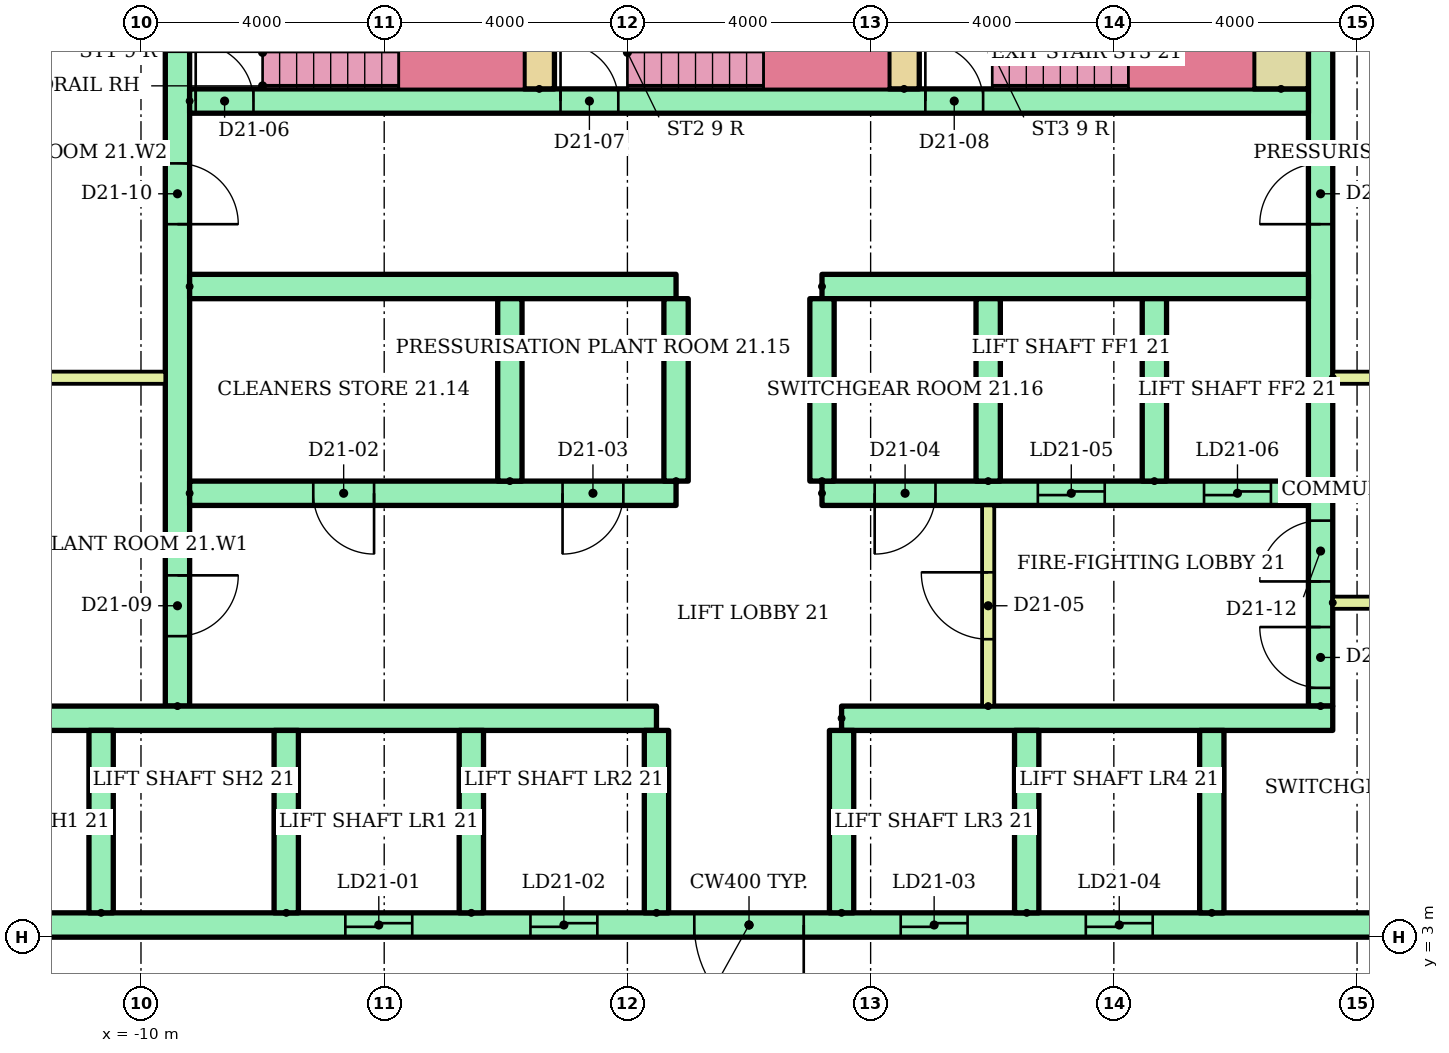
"""IFC4 building model, lengths in metres.
Left out: names, types, materials, properties, quantities, classifications, styles, units other than length and angle.
Written with IfcOpenShell. Run it as: python <this file> out.ifc"""

import sys

from ifc_helpers import new_model, si_unit, direction, frame, frame_2d, origin, place, context, subcontext, project, spatial, rectangle, extrude, element, fill, save


model = new_model("IFC4")
c1 = context("Model", 3, precision=1e-05, world=origin(), true_north=direction((0.0, 1.0)))
c2 = subcontext(c1, "Body", "Model", "MODEL_VIEW")
j1 = project(units=[si_unit("LENGTHUNIT", "METRE"), si_unit("PLANEANGLEUNIT", "RADIAN")], contexts=[c1])
p1 = place(None, origin())
s1 = spatial("IfcSite", under=j1, at=p1, CompositionType="ELEMENT")
p2 = place(p1, origin())
s2 = spatial("IfcBuilding", under=s1, at=p2, CompositionType="ELEMENT")
p3 = place(p2, frame((0.0, 0.0, 83.9)))
s3 = spatial("IfcBuildingStorey", under=s2, at=p3, CompositionType="ELEMENT", Elevation=83.9)
p4 = place(p3, frame((-9.4, 6.8, 0.0), z_axis=(0.0, 0.0, 1.0), x_axis=(0.0, 1.0, 0.0)))
e1 = element("IfcWall", 1, at=p4, inside=s3, PredefinedType="SHEAR", context=c2, shape_type="SweptSolid", body=[
    extrude(rectangle(XDim=12.7, YDim=0.4, at=frame_2d((6.35, 0.0))), origin(), (0.0, 0.0, 1.0), 2.92),
])
p5 = place(p4, frame((1.15, 0.0, 0.0)))
e2 = element("IfcOpeningElement", 2, at=p5, cuts=e1, PredefinedType="OPENING", context=c2, shape_type="SweptSolid", body=[
    extrude(rectangle(XDim=1.0, YDim=2.1, at=frame_2d((0.5, 1.05))), frame((0.0, 0.21, 0.0), z_axis=(0.0, -1.0, 0.0), x_axis=(1.0, 0.0, 0.0)), (0.0, 0.0, 1.0), 0.42),
])
p6 = place(p4, frame((7.925, 0.0, 0.0)))
e3 = element("IfcOpeningElement", 3, at=p6, cuts=e1, PredefinedType="OPENING", context=c2, shape_type="SweptSolid", body=[
    extrude(rectangle(XDim=1.0, YDim=2.1, at=frame_2d((0.5, 1.05))), frame((0.0, 0.21, 0.0), z_axis=(0.0, -1.0, 0.0), x_axis=(1.0, 0.0, 0.0)), (0.0, 0.0, 1.0), 0.42),
])
p7 = place(p3, frame((9.4, 6.8, 0.0), z_axis=(0.0, 0.0, 1.0), x_axis=(0.0, 1.0, 0.0)))
e4 = element("IfcWall", 4, at=p7, inside=s3, PredefinedType="SHEAR", context=c2, shape_type="SweptSolid", body=[
    extrude(rectangle(XDim=12.7, YDim=0.4, at=frame_2d((6.35, 0.0))), origin(), (0.0, 0.0, 1.0), 2.92),
])
p8 = place(p7, frame((0.3, 0.0, 0.0)))
e5 = element("IfcOpeningElement", 5, at=p8, cuts=e4, PredefinedType="OPENING", context=c2, shape_type="SweptSolid", body=[
    extrude(rectangle(XDim=1.0, YDim=2.1, at=frame_2d((0.5, 1.05))), frame((0.0, 0.21, 0.0), z_axis=(0.0, -1.0, 0.0), x_axis=(1.0, 0.0, 0.0)), (0.0, 0.0, 1.0), 0.42),
])
p9 = place(p7, frame((2.05, 0.0, 0.0)))
e6 = element("IfcOpeningElement", 6, at=p9, cuts=e4, PredefinedType="OPENING", context=c2, shape_type="SweptSolid", body=[
    extrude(rectangle(XDim=1.0, YDim=2.1, at=frame_2d((0.5, 1.05))), frame((0.0, 0.21, 0.0), z_axis=(0.0, -1.0, 0.0), x_axis=(1.0, 0.0, 0.0)), (0.0, 0.0, 1.0), 0.42),
])
p10 = place(p7, frame((7.925, 0.0, 0.0)))
e7 = element("IfcOpeningElement", 7, at=p10, cuts=e4, PredefinedType="OPENING", context=c2, shape_type="SweptSolid", body=[
    extrude(rectangle(XDim=1.0, YDim=2.1, at=frame_2d((0.5, 1.05))), frame((0.0, 0.21, 0.0), z_axis=(0.0, -1.0, 0.0), x_axis=(1.0, 0.0, 0.0)), (0.0, 0.0, 1.0), 0.42),
])
p11 = place(p3, frame((-13.5, 3.2, 0.0)))
e8 = element("IfcWall", 8, at=p11, inside=s3, PredefinedType="SHEAR", context=c2, shape_type="SweptSolid", body=[
    extrude(rectangle(XDim=27.0, YDim=0.4, at=frame_2d((13.5, 0.0))), origin(), (0.0, 0.0, 1.0), 2.92),
])
p12 = place(p11, frame((6.861, 0.0, 0.0)))
e9 = element("IfcOpeningElement", 9, at=p12, cuts=e8, PredefinedType="OPENING", context=c2, shape_type="SweptSolid", body=[
    extrude(rectangle(XDim=1.1, YDim=2.1, at=frame_2d((0.55, 1.05))), frame((0.0, 0.21, 0.0), z_axis=(0.0, -1.0, 0.0), x_axis=(1.0, 0.0, 0.0)), (0.0, 0.0, 1.0), 0.42),
])
p13 = place(p11, frame((9.906, 0.0, 0.0)))
e10 = element("IfcOpeningElement", 10, at=p13, cuts=e8, PredefinedType="OPENING", context=c2, shape_type="SweptSolid", body=[
    extrude(rectangle(XDim=1.1, YDim=2.1, at=frame_2d((0.55, 1.05))), frame((0.0, 0.21, 0.0), z_axis=(0.0, -1.0, 0.0), x_axis=(1.0, 0.0, 0.0)), (0.0, 0.0, 1.0), 0.42),
])
p14 = place(p11, frame((15.994, 0.0, 0.0)))
e11 = element("IfcOpeningElement", 11, at=p14, cuts=e8, PredefinedType="OPENING", context=c2, shape_type="SweptSolid", body=[
    extrude(rectangle(XDim=1.1, YDim=2.1, at=frame_2d((0.55, 1.05))), frame((0.0, 0.21, 0.0), z_axis=(0.0, -1.0, 0.0), x_axis=(1.0, 0.0, 0.0)), (0.0, 0.0, 1.0), 0.42),
])
p15 = place(p11, frame((19.039, 0.0, 0.0)))
e12 = element("IfcOpeningElement", 12, at=p15, cuts=e8, PredefinedType="OPENING", context=c2, shape_type="SweptSolid", body=[
    extrude(rectangle(XDim=1.1, YDim=2.1, at=frame_2d((0.55, 1.05))), frame((0.0, 0.21, 0.0), z_axis=(0.0, -1.0, 0.0), x_axis=(1.0, 0.0, 0.0)), (0.0, 0.0, 1.0), 0.42),
])
p16 = place(p11, frame((12.6, 0.0, 0.0)))
e13 = element("IfcOpeningElement", 13, at=p16, cuts=e8, PredefinedType="OPENING", context=c2, shape_type="SweptSolid", body=[
    extrude(rectangle(XDim=1.8, YDim=2.1, at=frame_2d((0.9, 1.05))), frame((0.0, 0.21, 0.0), z_axis=(0.0, -1.0, 0.0), x_axis=(1.0, 0.0, 0.0)), (0.0, 0.0, 1.0), 0.42),
])
p17 = place(p3, frame((-13.5, 6.6, 0.0)))
e14 = element("IfcWall", 14, at=p17, inside=s3, PredefinedType="SHEAR", context=c2, shape_type="SweptSolid", body=[
    extrude(rectangle(XDim=11.978, YDim=0.4, at=frame_2d((5.989, 0.0))), origin(), (0.0, 0.0, 1.0), 2.92),
])
p18 = place(p3, frame((1.522, 6.6, 0.0)))
e15 = element("IfcWall", 15, at=p18, inside=s3, PredefinedType="SHEAR", context=c2, shape_type="SweptSolid", body=[
    extrude(rectangle(XDim=8.078, YDim=0.4, at=frame_2d((4.039, 0.0))), origin(), (0.0, 0.0, 1.0), 2.92),
])
for number, where, z_axis, x_axis in (
    (16, (-10.656, 3.4, 0.0), (0.0, 0.0, 1.0), (0.0, 1.0, 0.0)),
    (17, (-7.611, 3.4, 0.0), (0.0, 0.0, 1.0), (0.0, 1.0, 0.0)),
    (18, (-4.567, 3.4, 0.0), (0.0, 0.0, 1.0), (0.0, 1.0, 0.0)),
    (19, (-1.522, 3.4, 0.0), (0.0, 0.0, 1.0), (0.0, 1.0, 0.0)),
    (20, (1.522, 3.4, 0.0), (0.0, 0.0, 1.0), (0.0, 1.0, 0.0)),
    (21, (4.567, 3.4, 0.0), (0.0, 0.0, 1.0), (0.0, 1.0, 0.0)),
    (22, (7.611, 3.4, 0.0), (0.0, 0.0, 1.0), (0.0, 1.0, 0.0)),
):
    element("IfcWall", number, at=place(p3, frame(where, z_axis=z_axis, x_axis=x_axis)), inside=s3, PredefinedType="SHEAR", context=c2, shape_type="SweptSolid", body=[
        extrude(rectangle(XDim=3.0, YDim=0.4, at=frame_2d((1.5, 0.0))), origin(), (0.0, 0.0, 1.0), 2.92),
    ])
p19 = place(p3, frame((-9.2, 10.3, 0.0)))
e23 = element("IfcWall", 23, at=p19, inside=s3, PredefinedType="SHEAR", context=c2, shape_type="SweptSolid", body=[
    extrude(rectangle(XDim=8.0, YDim=0.4, at=frame_2d((4.0, 0.0))), origin(), (0.0, 0.0, 1.0), 2.92),
])
p20 = place(p19, frame((2.033, 0.0, 0.0)))
e24 = element("IfcOpeningElement", 24, at=p20, cuts=e23, PredefinedType="OPENING", context=c2, shape_type="SweptSolid", body=[
    extrude(rectangle(XDim=1.0, YDim=2.1, at=frame_2d((0.5, 1.05))), frame((0.0, 0.21, 0.0), z_axis=(0.0, -1.0, 0.0), x_axis=(1.0, 0.0, 0.0)), (0.0, 0.0, 1.0), 0.42),
])
p21 = place(p19, frame((6.133, 0.0, 0.0)))
e25 = element("IfcOpeningElement", 25, at=p21, cuts=e23, PredefinedType="OPENING", context=c2, shape_type="SweptSolid", body=[
    extrude(rectangle(XDim=1.0, YDim=2.1, at=frame_2d((0.5, 1.05))), frame((0.0, 0.21, 0.0), z_axis=(0.0, -1.0, 0.0), x_axis=(1.0, 0.0, 0.0)), (0.0, 0.0, 1.0), 0.42),
])
p22 = place(p3, frame((-9.2, 13.7, 0.0)))
e26 = element("IfcWall", 26, at=p22, inside=s3, PredefinedType="SHEAR", context=c2, shape_type="SweptSolid", body=[
    extrude(rectangle(XDim=8.0, YDim=0.4, at=frame_2d((4.0, 0.0))), origin(), (0.0, 0.0, 1.0), 2.92),
])
p23 = place(p3, frame((1.2, 10.3, 0.0)))
e27 = element("IfcWall", 27, at=p23, inside=s3, PredefinedType="SHEAR", context=c2, shape_type="SweptSolid", body=[
    extrude(rectangle(XDim=8.0, YDim=0.4, at=frame_2d((4.0, 0.0))), origin(), (0.0, 0.0, 1.0), 2.92),
])
p24 = place(p23, frame((3.55, 0.0, 0.0)))
e28 = element("IfcOpeningElement", 28, at=p24, cuts=e27, PredefinedType="OPENING", context=c2, shape_type="SweptSolid", body=[
    extrude(rectangle(XDim=1.1, YDim=2.1, at=frame_2d((0.55, 1.05))), frame((0.0, 0.21, 0.0), z_axis=(0.0, -1.0, 0.0), x_axis=(1.0, 0.0, 0.0)), (0.0, 0.0, 1.0), 0.42),
])
p25 = place(p23, frame((6.283, 0.0, 0.0)))
e29 = element("IfcOpeningElement", 29, at=p25, cuts=e27, PredefinedType="OPENING", context=c2, shape_type="SweptSolid", body=[
    extrude(rectangle(XDim=1.1, YDim=2.1, at=frame_2d((0.55, 1.05))), frame((0.0, 0.21, 0.0), z_axis=(0.0, -1.0, 0.0), x_axis=(1.0, 0.0, 0.0)), (0.0, 0.0, 1.0), 0.42),
])
p26 = place(p23, frame((0.867, 0.0, 0.0)))
e30 = element("IfcOpeningElement", 30, at=p26, cuts=e27, PredefinedType="OPENING", context=c2, shape_type="SweptSolid", body=[
    extrude(rectangle(XDim=1.0, YDim=2.1, at=frame_2d((0.5, 1.05))), frame((0.0, 0.21, 0.0), z_axis=(0.0, -1.0, 0.0), x_axis=(1.0, 0.0, 0.0)), (0.0, 0.0, 1.0), 0.42),
])
p27 = place(p3, frame((1.2, 13.7, 0.0)))
e31 = element("IfcWall", 31, at=p27, inside=s3, PredefinedType="SHEAR", context=c2, shape_type="SweptSolid", body=[
    extrude(rectangle(XDim=8.0, YDim=0.4, at=frame_2d((4.0, 0.0))), origin(), (0.0, 0.0, 1.0), 2.92),
])
for number, where, z_axis, x_axis in (
    (32, (-3.933, 10.5, 0.0), (0.0, 0.0, 1.0), (0.0, 1.0, 0.0)),
    (33, (-1.2, 10.5, 0.0), (0.0, 0.0, 1.0), (0.0, 1.0, 0.0)),
    (34, (1.2, 10.5, 0.0), (0.0, 0.0, 1.0), (0.0, 1.0, 0.0)),
    (35, (3.933, 10.5, 0.0), (0.0, 0.0, 1.0), (0.0, 1.0, 0.0)),
    (36, (6.667, 10.5, 0.0), (0.0, 0.0, 1.0), (0.0, 1.0, 0.0)),
):
    element("IfcWall", number, at=place(p3, frame(where, z_axis=z_axis, x_axis=x_axis)), inside=s3, PredefinedType="SHEAR", context=c2, shape_type="SweptSolid", body=[
        extrude(rectangle(XDim=3.0, YDim=0.4, at=frame_2d((1.5, 0.0))), origin(), (0.0, 0.0, 1.0), 2.92),
    ])
p28 = place(p3, frame((3.933, 6.8, 0.0), z_axis=(0.0, 0.0, 1.0), x_axis=(0.0, 1.0, 0.0)))
e37 = element("IfcWall", 37, at=p28, inside=s3, PredefinedType="PARTITIONING", context=c2, shape_type="SweptSolid", body=[
    extrude(rectangle(XDim=3.3, YDim=0.2, at=frame_2d((1.65, 0.0))), origin(), (0.0, 0.0, 1.0), 2.92),
])
p29 = place(p28, frame((1.1, 0.0, 0.0)))
e38 = element("IfcOpeningElement", 38, at=p29, cuts=e37, PredefinedType="OPENING", context=c2, shape_type="SweptSolid", body=[
    extrude(rectangle(XDim=1.1, YDim=2.1, at=frame_2d((0.55, 1.05))), frame((0.0, 0.11, 0.0), z_axis=(0.0, -1.0, 0.0), x_axis=(1.0, 0.0, 0.0)), (0.0, 0.0, 1.0), 0.22),
])
p30 = place(p3, frame((-9.2, 16.75, 0.0)))
e39 = element("IfcWall", 39, at=p30, inside=s3, PredefinedType="SHEAR", context=c2, shape_type="SweptSolid", body=[
    extrude(rectangle(XDim=18.4, YDim=0.4, at=frame_2d((9.2, 0.0))), origin(), (0.0, 0.0, 1.0), 2.92),
])
p31 = place(p30, frame((0.1, 0.0, 0.0)))
e40 = element("IfcOpeningElement", 40, at=p31, cuts=e39, PredefinedType="OPENING", context=c2, shape_type="SweptSolid", body=[
    extrude(rectangle(XDim=0.95, YDim=2.1, at=frame_2d((0.475, 1.05))), frame((0.0, 0.21, 0.0), z_axis=(0.0, -1.0, 0.0), x_axis=(1.0, 0.0, 0.0)), (0.0, 0.0, 1.0), 0.42),
])
p32 = place(p30, frame((6.1, 0.0, 0.0)))
e41 = element("IfcOpeningElement", 41, at=p32, cuts=e39, PredefinedType="OPENING", context=c2, shape_type="SweptSolid", body=[
    extrude(rectangle(XDim=0.95, YDim=2.1, at=frame_2d((0.475, 1.05))), frame((0.0, 0.21, 0.0), z_axis=(0.0, -1.0, 0.0), x_axis=(1.0, 0.0, 0.0)), (0.0, 0.0, 1.0), 0.42),
])
p33 = place(p30, frame((12.1, 0.0, 0.0)))
e42 = element("IfcOpeningElement", 42, at=p33, cuts=e39, PredefinedType="OPENING", context=c2, shape_type="SweptSolid", body=[
    extrude(rectangle(XDim=0.95, YDim=2.1, at=frame_2d((0.475, 1.05))), frame((0.0, 0.21, 0.0), z_axis=(0.0, -1.0, 0.0), x_axis=(1.0, 0.0, 0.0)), (0.0, 0.0, 1.0), 0.42),
])
for number, where, z_axis, x_axis in (
    (43, (-3.45, 16.95, 0.0), (0.0, 0.0, 1.0), (0.0, 1.0, 0.0)),
    (44, (2.55, 16.95, 0.0), (0.0, 0.0, 1.0), (0.0, 1.0, 0.0)),
):
    element("IfcWall", number, at=place(p3, frame(where, z_axis=z_axis, x_axis=x_axis)), inside=s3, PredefinedType="SHEAR", context=c2, shape_type="SweptSolid", body=[
        extrude(rectangle(XDim=2.55, YDim=0.5, at=frame_2d((1.275, 0.0))), origin(), (0.0, 0.0, 1.0), 2.92),
    ])
p34 = place(p3, frame((8.75, 16.95, 0.0), z_axis=(0.0, 0.0, 1.0), x_axis=(0.0, 1.0, 0.0)))
e45 = element("IfcWall", 45, at=p34, inside=s3, PredefinedType="SHEAR", context=c2, shape_type="SweptSolid", body=[
    extrude(rectangle(XDim=2.55, YDim=0.9, at=frame_2d((1.275, 0.0))), origin(), (0.0, 0.0, 1.0), 2.92),
])
for number, where in (
    (46, (-13.5, 12.2, 0.0)),
    (47, (9.6, 8.5, 0.0)),
    (48, (9.6, 12.2, 0.0)),
):
    element("IfcWall", number, at=place(p3, frame(where)), inside=s3, PredefinedType="PARTITIONING", context=c2, shape_type="SweptSolid", body=[
        extrude(rectangle(XDim=3.9, YDim=0.2, at=frame_2d((1.95, 0.0))), origin(), (0.0, 0.0, 1.0), 2.92),
    ])
p35 = place(p12, origin())
e49 = element("IfcDoor", 49, at=p35, inside=s3, OperationType="SLIDING_TO_LEFT", PredefinedType="DOOR", context=c2, shape_type="SweptSolid", body=[
    extrude(rectangle(XDim=1.1, YDim=2.1, at=frame_2d((0.55, 1.05))), frame((0.0, 0.025, 0.0), z_axis=(0.0, -1.0, 0.0), x_axis=(1.0, 0.0, 0.0)), (0.0, 0.0, 1.0), 0.05),
])
fill(e9, e49)
p36 = place(p13, origin())
e50 = element("IfcDoor", 50, at=p36, inside=s3, OperationType="SLIDING_TO_LEFT", PredefinedType="DOOR", context=c2, shape_type="SweptSolid", body=[
    extrude(rectangle(XDim=1.1, YDim=2.1, at=frame_2d((0.55, 1.05))), frame((0.0, 0.025, 0.0), z_axis=(0.0, -1.0, 0.0), x_axis=(1.0, 0.0, 0.0)), (0.0, 0.0, 1.0), 0.05),
])
fill(e10, e50)
p37 = place(p14, origin())
e51 = element("IfcDoor", 51, at=p37, inside=s3, OperationType="SLIDING_TO_LEFT", PredefinedType="DOOR", context=c2, shape_type="SweptSolid", body=[
    extrude(rectangle(XDim=1.1, YDim=2.1, at=frame_2d((0.55, 1.05))), frame((0.0, 0.025, 0.0), z_axis=(0.0, -1.0, 0.0), x_axis=(1.0, 0.0, 0.0)), (0.0, 0.0, 1.0), 0.05),
])
fill(e11, e51)
p38 = place(p15, origin())
e52 = element("IfcDoor", 52, at=p38, inside=s3, OperationType="SLIDING_TO_LEFT", PredefinedType="DOOR", context=c2, shape_type="SweptSolid", body=[
    extrude(rectangle(XDim=1.1, YDim=2.1, at=frame_2d((0.55, 1.05))), frame((0.0, 0.025, 0.0), z_axis=(0.0, -1.0, 0.0), x_axis=(1.0, 0.0, 0.0)), (0.0, 0.0, 1.0), 0.05),
])
fill(e12, e52)
p39 = place(p16, frame((1.8, 0.0, 0.0), z_axis=(0.0, 0.0, 1.0), x_axis=(-1.0, 0.0, 0.0)))
e53 = element("IfcDoor", 53, at=p39, inside=s3, OperationType="DOUBLE_DOOR_SINGLE_SWING", PredefinedType="DOOR", context=c2, shape_type="SweptSolid", body=[
    extrude(rectangle(XDim=1.8, YDim=2.1, at=frame_2d((0.9, 1.05))), frame((0.0, 0.025, 0.0), z_axis=(0.0, -1.0, 0.0), x_axis=(1.0, 0.0, 0.0)), (0.0, 0.0, 1.0), 0.05),
])
fill(e13, e53)
p40 = place(p24, origin())
e54 = element("IfcDoor", 54, at=p40, inside=s3, OperationType="SLIDING_TO_LEFT", PredefinedType="DOOR", context=c2, shape_type="SweptSolid", body=[
    extrude(rectangle(XDim=1.1, YDim=2.1, at=frame_2d((0.55, 1.05))), frame((0.0, 0.025, 0.0), z_axis=(0.0, -1.0, 0.0), x_axis=(1.0, 0.0, 0.0)), (0.0, 0.0, 1.0), 0.05),
])
fill(e28, e54)
p41 = place(p25, origin())
e55 = element("IfcDoor", 55, at=p41, inside=s3, OperationType="SLIDING_TO_LEFT", PredefinedType="DOOR", context=c2, shape_type="SweptSolid", body=[
    extrude(rectangle(XDim=1.1, YDim=2.1, at=frame_2d((0.55, 1.05))), frame((0.0, 0.025, 0.0), z_axis=(0.0, -1.0, 0.0), x_axis=(1.0, 0.0, 0.0)), (0.0, 0.0, 1.0), 0.05),
])
fill(e29, e55)
p42 = place(p20, frame((1.0, 0.0, 0.0), z_axis=(0.0, 0.0, 1.0), x_axis=(-1.0, 0.0, 0.0)))
e56 = element("IfcDoor", 56, at=p42, inside=s3, OperationType="SINGLE_SWING_RIGHT", PredefinedType="DOOR", context=c2, shape_type="SweptSolid", body=[
    extrude(rectangle(XDim=1.0, YDim=2.1, at=frame_2d((0.5, 1.05))), frame((0.0, 0.025, 0.0), z_axis=(0.0, -1.0, 0.0), x_axis=(1.0, 0.0, 0.0)), (0.0, 0.0, 1.0), 0.05),
])
fill(e24, e56)
p43 = place(p21, frame((1.0, 0.0, 0.0), z_axis=(0.0, 0.0, 1.0), x_axis=(-1.0, 0.0, 0.0)))
e57 = element("IfcDoor", 57, at=p43, inside=s3, OperationType="SINGLE_SWING_LEFT", PredefinedType="DOOR", context=c2, shape_type="SweptSolid", body=[
    extrude(rectangle(XDim=1.0, YDim=2.1, at=frame_2d((0.5, 1.05))), frame((0.0, 0.025, 0.0), z_axis=(0.0, -1.0, 0.0), x_axis=(1.0, 0.0, 0.0)), (0.0, 0.0, 1.0), 0.05),
])
fill(e25, e57)
p44 = place(p26, frame((1.0, 0.0, 0.0), z_axis=(0.0, 0.0, 1.0), x_axis=(-1.0, 0.0, 0.0)))
e58 = element("IfcDoor", 58, at=p44, inside=s3, OperationType="SINGLE_SWING_LEFT", PredefinedType="DOOR", context=c2, shape_type="SweptSolid", body=[
    extrude(rectangle(XDim=1.0, YDim=2.1, at=frame_2d((0.5, 1.05))), frame((0.0, 0.025, 0.0), z_axis=(0.0, -1.0, 0.0), x_axis=(1.0, 0.0, 0.0)), (0.0, 0.0, 1.0), 0.05),
])
fill(e30, e58)
p45 = place(p29, origin())
e59 = element("IfcDoor", 59, at=p45, inside=s3, OperationType="SINGLE_SWING_RIGHT", PredefinedType="DOOR", context=c2, shape_type="SweptSolid", body=[
    extrude(rectangle(XDim=1.1, YDim=2.1, at=frame_2d((0.55, 1.05))), frame((0.0, 0.025, 0.0), z_axis=(0.0, -1.0, 0.0), x_axis=(1.0, 0.0, 0.0)), (0.0, 0.0, 1.0), 0.05),
])
fill(e38, e59)
p46 = place(p31, origin())
e60 = element("IfcDoor", 60, at=p46, inside=s3, OperationType="SINGLE_SWING_LEFT", PredefinedType="DOOR", context=c2, shape_type="SweptSolid", body=[
    extrude(rectangle(XDim=0.95, YDim=2.1, at=frame_2d((0.475, 1.05))), frame((0.0, 0.025, 0.0), z_axis=(0.0, -1.0, 0.0), x_axis=(1.0, 0.0, 0.0)), (0.0, 0.0, 1.0), 0.05),
])
fill(e40, e60)
p47 = place(p32, origin())
e61 = element("IfcDoor", 61, at=p47, inside=s3, OperationType="SINGLE_SWING_LEFT", PredefinedType="DOOR", context=c2, shape_type="SweptSolid", body=[
    extrude(rectangle(XDim=0.95, YDim=2.1, at=frame_2d((0.475, 1.05))), frame((0.0, 0.025, 0.0), z_axis=(0.0, -1.0, 0.0), x_axis=(1.0, 0.0, 0.0)), (0.0, 0.0, 1.0), 0.05),
])
fill(e41, e61)
p48 = place(p33, origin())
e62 = element("IfcDoor", 62, at=p48, inside=s3, OperationType="SINGLE_SWING_LEFT", PredefinedType="DOOR", context=c2, shape_type="SweptSolid", body=[
    extrude(rectangle(XDim=0.95, YDim=2.1, at=frame_2d((0.475, 1.05))), frame((0.0, 0.025, 0.0), z_axis=(0.0, -1.0, 0.0), x_axis=(1.0, 0.0, 0.0)), (0.0, 0.0, 1.0), 0.05),
])
fill(e42, e62)
p49 = place(p5, frame((1.0, 0.0, 0.0), z_axis=(0.0, 0.0, 1.0), x_axis=(-1.0, 0.0, 0.0)))
e63 = element("IfcDoor", 63, at=p49, inside=s3, OperationType="SINGLE_SWING_RIGHT", PredefinedType="DOOR", context=c2, shape_type="SweptSolid", body=[
    extrude(rectangle(XDim=1.0, YDim=2.1, at=frame_2d((0.5, 1.05))), frame((0.0, 0.025, 0.0), z_axis=(0.0, -1.0, 0.0), x_axis=(1.0, 0.0, 0.0)), (0.0, 0.0, 1.0), 0.05),
])
fill(e2, e63)
p50 = place(p6, frame((1.0, 0.0, 0.0), z_axis=(0.0, 0.0, 1.0), x_axis=(-1.0, 0.0, 0.0)))
e64 = element("IfcDoor", 64, at=p50, inside=s3, OperationType="SINGLE_SWING_LEFT", PredefinedType="DOOR", context=c2, shape_type="SweptSolid", body=[
    extrude(rectangle(XDim=1.0, YDim=2.1, at=frame_2d((0.5, 1.05))), frame((0.0, 0.025, 0.0), z_axis=(0.0, -1.0, 0.0), x_axis=(1.0, 0.0, 0.0)), (0.0, 0.0, 1.0), 0.05),
])
fill(e3, e64)
p51 = place(p8, origin())
e65 = element("IfcDoor", 65, at=p51, inside=s3, OperationType="SINGLE_SWING_RIGHT", PredefinedType="DOOR", context=c2, shape_type="SweptSolid", body=[
    extrude(rectangle(XDim=1.0, YDim=2.1, at=frame_2d((0.5, 1.05))), frame((0.0, 0.025, 0.0), z_axis=(0.0, -1.0, 0.0), x_axis=(1.0, 0.0, 0.0)), (0.0, 0.0, 1.0), 0.05),
])
fill(e5, e65)
p52 = place(p9, origin())
e66 = element("IfcDoor", 66, at=p52, inside=s3, OperationType="SINGLE_SWING_LEFT", PredefinedType="DOOR", context=c2, shape_type="SweptSolid", body=[
    extrude(rectangle(XDim=1.0, YDim=2.1, at=frame_2d((0.5, 1.05))), frame((0.0, 0.025, 0.0), z_axis=(0.0, -1.0, 0.0), x_axis=(1.0, 0.0, 0.0)), (0.0, 0.0, 1.0), 0.05),
])
fill(e6, e66)
p53 = place(p10, origin())
e67 = element("IfcDoor", 67, at=p53, inside=s3, OperationType="SINGLE_SWING_LEFT", PredefinedType="DOOR", context=c2, shape_type="SweptSolid", body=[
    extrude(rectangle(XDim=1.0, YDim=2.1, at=frame_2d((0.5, 1.05))), frame((0.0, 0.025, 0.0), z_axis=(0.0, -1.0, 0.0), x_axis=(1.0, 0.0, 0.0)), (0.0, 0.0, 1.0), 0.05),
])
fill(e7, e67)
save(model, sys.argv[1])
